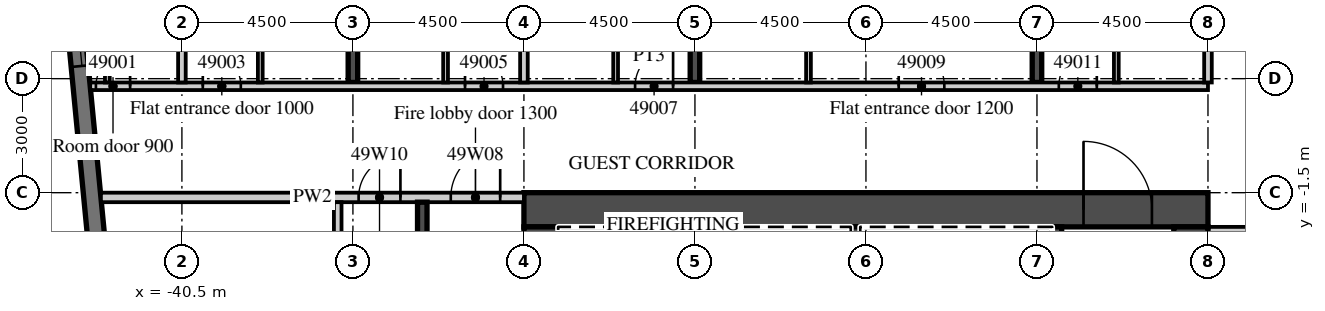
"""IFC4 building model, lengths in metres.
Left out: names, types, materials, properties, quantities, classifications, styles, units other than length and angle.
Written with IfcOpenShell. Run it as: python <this file> out.ifc"""

import sys

from ifc_helpers import new_model, si_unit, direction, frame, frame_2d, origin, place, context, subcontext, project, spatial, rectangle, extrude, element, fill, save


model = new_model("IFC4")
c1 = context("Model", 3, precision=1e-05, world=origin(), true_north=direction((0.0, 1.0)))
c2 = subcontext(c1, "Body", "Model", "MODEL_VIEW")
j1 = project(units=[si_unit("LENGTHUNIT", "METRE"), si_unit("PLANEANGLEUNIT", "RADIAN")], contexts=[c1])
p1 = place(None, origin())
s1 = spatial("IfcSite", under=j1, at=p1, CompositionType="ELEMENT")
p2 = place(p1, origin())
s2 = spatial("IfcBuilding", under=s1, at=p2, CompositionType="ELEMENT")
p3 = place(p2, frame((0.0, 0.0, 203.2)))
s3 = spatial("IfcBuildingStorey", under=s2, at=p3, CompositionType="ELEMENT", Elevation=203.2)
p4 = place(p3, frame((-36.0, 1.4, 0.0), z_axis=(0.0, 0.0, 1.0), x_axis=(0.0, 1.0, 0.0)))
e1 = element("IfcWall", 1, at=p4, inside=s3, PredefinedType="SHEAR", context=c2, shape_type="SweptSolid", body=[
    extrude(rectangle(XDim=15.401, YDim=0.25, at=frame_2d((7.701, 0.0))), origin(), (0.0, 0.0, 1.0), 3.0),
])
p5 = place(p3, frame((-27.0, 1.4, 0.0), z_axis=(0.0, 0.0, 1.0), x_axis=(0.0, 1.0, 0.0)))
e2 = element("IfcWall", 2, at=p5, inside=s3, PredefinedType="SHEAR", context=c2, shape_type="SweptSolid", body=[
    extrude(rectangle(XDim=16.268, YDim=0.25, at=frame_2d((8.134, 0.0))), origin(), (0.0, 0.0, 1.0), 3.0),
])
p6 = place(p3, frame((-18.0, 1.4, 0.0), z_axis=(0.0, 0.0, 1.0), x_axis=(0.0, 1.0, 0.0)))
e3 = element("IfcWall", 3, at=p6, inside=s3, PredefinedType="SHEAR", context=c2, shape_type="SweptSolid", body=[
    extrude(rectangle(XDim=17.134, YDim=0.25, at=frame_2d((8.567, 0.0))), origin(), (0.0, 0.0, 1.0), 3.0),
])
p7 = place(p3, frame((-44.214, 12.466, 0.0), z_axis=(0.0, 0.0, 1.0), x_axis=(0.095847314626, -0.995396047952, 0.0)))
e4 = element("IfcWall", 4, at=p7, inside=s3, PredefinedType="SOLIDWALL", context=c2, shape_type="SweptSolid", body=[
    extrude(rectangle(XDim=34.0, YDim=0.45, at=frame_2d((17.0, 0.0))), origin(), (0.0, 0.0, 1.0), 3.0),
])
p8 = place(p7, frame((2.865, 0.0, 0.45)))
e5 = element("IfcOpeningElement", 5, at=p8, cuts=e4, PredefinedType="OPENING", context=c2, shape_type="SweptSolid", body=[
    extrude(rectangle(XDim=3.3, YDim=2.25, at=frame_2d((1.65, 1.125))), frame((0.0, 0.235, 0.0), z_axis=(0.0, -1.0, 0.0), x_axis=(1.0, 0.0, 0.0)), (0.0, 0.0, 1.0), 0.47),
])
p9 = place(p7, frame((7.386, 0.0, 0.45)))
e6 = element("IfcOpeningElement", 6, at=p9, cuts=e4, PredefinedType="OPENING", context=c2, shape_type="SweptSolid", body=[
    extrude(rectangle(XDim=3.3, YDim=2.25, at=frame_2d((1.65, 1.125))), frame((0.0, 0.235, 0.0), z_axis=(0.0, -1.0, 0.0), x_axis=(1.0, 0.0, 0.0)), (0.0, 0.0, 1.0), 0.47),
])
p10 = place(p3, frame((-42.913, 1.3, 0.0), z_axis=(0.0, 0.0, 1.0), x_axis=(1.0, 0.0, 0.0)))
e7 = element("IfcWall", 7, at=p10, inside=s3, PredefinedType="PARTITIONING", context=c2, shape_type="SweptSolid", body=[
    extrude(rectangle(XDim=29.413, YDim=0.2, at=frame_2d((14.707, 0.0))), origin(), (0.0, 0.0, 1.0), 3.0),
])
p11 = place(p10, frame((0.15, 0.0, 0.0)))
e8 = element("IfcOpeningElement", 8, at=p11, cuts=e7, PredefinedType="OPENING", context=c2, shape_type="SweptSolid", body=[
    extrude(rectangle(XDim=0.9, YDim=2.1, at=frame_2d((0.45, 1.05))), frame((0.0, 0.11, 0.0), z_axis=(0.0, -1.0, 0.0), x_axis=(1.0, 0.0, 0.0)), (0.0, 0.0, 1.0), 0.22),
])
p12 = place(p10, frame((2.963, 0.0, 0.0)))
e9 = element("IfcOpeningElement", 9, at=p12, cuts=e7, PredefinedType="OPENING", context=c2, shape_type="SweptSolid", body=[
    extrude(rectangle(XDim=1.0, YDim=2.1, at=frame_2d((0.5, 1.05))), frame((0.0, 0.11, 0.0), z_axis=(0.0, -1.0, 0.0), x_axis=(1.0, 0.0, 0.0)), (0.0, 0.0, 1.0), 0.22),
])
p13 = place(p10, frame((9.863, 0.0, 0.0)))
e10 = element("IfcOpeningElement", 10, at=p13, cuts=e7, PredefinedType="OPENING", context=c2, shape_type="SweptSolid", body=[
    extrude(rectangle(XDim=1.0, YDim=2.1, at=frame_2d((0.5, 1.05))), frame((0.0, 0.11, 0.0), z_axis=(0.0, -1.0, 0.0), x_axis=(1.0, 0.0, 0.0)), (0.0, 0.0, 1.0), 0.22),
])
p14 = place(p10, frame((14.338, 0.0, 0.0)))
e11 = element("IfcOpeningElement", 11, at=p14, cuts=e7, PredefinedType="OPENING", context=c2, shape_type="SweptSolid", body=[
    extrude(rectangle(XDim=1.0, YDim=2.1, at=frame_2d((0.5, 1.05))), frame((0.0, 0.11, 0.0), z_axis=(0.0, -1.0, 0.0), x_axis=(1.0, 0.0, 0.0)), (0.0, 0.0, 1.0), 0.22),
])
p15 = place(p10, frame((21.275, 0.0, 0.0)))
e12 = element("IfcOpeningElement", 12, at=p15, cuts=e7, PredefinedType="OPENING", context=c2, shape_type="SweptSolid", body=[
    extrude(rectangle(XDim=1.2, YDim=2.1, at=frame_2d((0.6, 1.05))), frame((0.0, 0.11, 0.0), z_axis=(0.0, -1.0, 0.0), x_axis=(1.0, 0.0, 0.0)), (0.0, 0.0, 1.0), 0.22),
])
p16 = place(p10, frame((25.488, 0.0, 0.0)))
e13 = element("IfcOpeningElement", 13, at=p16, cuts=e7, PredefinedType="OPENING", context=c2, shape_type="SweptSolid", body=[
    extrude(rectangle(XDim=1.0, YDim=2.1, at=frame_2d((0.5, 1.05))), frame((0.0, 0.11, 0.0), z_axis=(0.0, -1.0, 0.0), x_axis=(1.0, 0.0, 0.0)), (0.0, 0.0, 1.0), 0.22),
])
p17 = place(p3, frame((-40.5, 1.4, 0.0), z_axis=(0.0, 0.0, 1.0), x_axis=(0.0, 1.0, 0.0)))
e14 = element("IfcWall", 14, at=p17, inside=s3, PredefinedType="PARTITIONING", context=c2, shape_type="SweptSolid", body=[
    extrude(rectangle(XDim=14.99, YDim=0.2, at=frame_2d((7.495, 0.0))), origin(), (0.0, 0.0, 1.0), 3.0),
])
p18 = place(p3, frame((-42.462, 1.4, 0.0), z_axis=(0.0, 0.0, 1.0), x_axis=(0.0, 1.0, 0.0)))
e15 = element("IfcWall", 15, at=p18, inside=s3, PredefinedType="PARTITIONING", context=c2, shape_type="SweptSolid", body=[
    extrude(rectangle(XDim=4.028, YDim=0.125, at=frame_2d((2.014, 0.0))), origin(), (0.0, 0.0, 1.0), 3.0),
])
p19 = place(p18, frame((2.45, 0.0, 0.0)))
e16 = element("IfcOpeningElement", 16, at=p19, cuts=e15, PredefinedType="OPENING", context=c2, shape_type="SweptSolid", body=[
    extrude(rectangle(XDim=0.9, YDim=2.1, at=frame_2d((0.45, 1.05))), frame((0.0, 0.073, 0.0), z_axis=(0.0, -1.0, 0.0), x_axis=(1.0, 0.0, 0.0)), (0.0, 0.0, 1.0), 0.145),
])
p20 = place(p3, frame((-38.438, 1.4, 0.0), z_axis=(0.0, 0.0, 1.0), x_axis=(0.0, 1.0, 0.0)))
e17 = element("IfcWall", 17, at=p20, inside=s3, PredefinedType="PARTITIONING", context=c2, shape_type="SweptSolid", body=[
    extrude(rectangle(XDim=7.725, YDim=0.125, at=frame_2d((3.863, 0.0))), origin(), (0.0, 0.0, 1.0), 3.0),
])
p21 = place(p20, frame((2.45, 0.0, 0.0)))
e18 = element("IfcOpeningElement", 18, at=p21, cuts=e17, PredefinedType="OPENING", context=c2, shape_type="SweptSolid", body=[
    extrude(rectangle(XDim=0.9, YDim=2.1, at=frame_2d((0.45, 1.05))), frame((0.0, 0.073, 0.0), z_axis=(0.0, -1.0, 0.0), x_axis=(1.0, 0.0, 0.0)), (0.0, 0.0, 1.0), 0.145),
])
p22 = place(p3, frame((-31.5, 1.4, 0.0), z_axis=(0.0, 0.0, 1.0), x_axis=(0.0, 1.0, 0.0)))
e19 = element("IfcWall", 19, at=p22, inside=s3, PredefinedType="PARTITIONING", context=c2, shape_type="SweptSolid", body=[
    extrude(rectangle(XDim=15.856, YDim=0.2, at=frame_2d((7.928, 0.0))), origin(), (0.0, 0.0, 1.0), 3.0),
])
p23 = place(p3, frame((-33.562, 1.4, 0.0), z_axis=(0.0, 0.0, 1.0), x_axis=(0.0, 1.0, 0.0)))
e20 = element("IfcWall", 20, at=p23, inside=s3, PredefinedType="PARTITIONING", context=c2, shape_type="SweptSolid", body=[
    extrude(rectangle(XDim=7.725, YDim=0.125, at=frame_2d((3.863, 0.0))), origin(), (0.0, 0.0, 1.0), 3.0),
])
p24 = place(p23, frame((2.45, 0.0, 0.0)))
e21 = element("IfcOpeningElement", 21, at=p24, cuts=e20, PredefinedType="OPENING", context=c2, shape_type="SweptSolid", body=[
    extrude(rectangle(XDim=0.9, YDim=2.1, at=frame_2d((0.45, 1.05))), frame((0.0, 0.073, 0.0), z_axis=(0.0, -1.0, 0.0), x_axis=(1.0, 0.0, 0.0)), (0.0, 0.0, 1.0), 0.145),
])
p25 = place(p3, frame((-29.087, 1.4, 0.0), z_axis=(0.0, 0.0, 1.0), x_axis=(0.0, 1.0, 0.0)))
e22 = element("IfcWall", 22, at=p25, inside=s3, PredefinedType="PARTITIONING", context=c2, shape_type="SweptSolid", body=[
    extrude(rectangle(XDim=7.725, YDim=0.125, at=frame_2d((3.863, 0.0))), origin(), (0.0, 0.0, 1.0), 3.0),
])
p26 = place(p25, frame((2.45, 0.0, 0.0)))
e23 = element("IfcOpeningElement", 23, at=p26, cuts=e22, PredefinedType="OPENING", context=c2, shape_type="SweptSolid", body=[
    extrude(rectangle(XDim=0.9, YDim=2.1, at=frame_2d((0.45, 1.05))), frame((0.0, 0.073, 0.0), z_axis=(0.0, -1.0, 0.0), x_axis=(1.0, 0.0, 0.0)), (0.0, 0.0, 1.0), 0.145),
])
p27 = place(p3, frame((-24.012, 1.4, 0.0), z_axis=(0.0, 0.0, 1.0), x_axis=(0.0, 1.0, 0.0)))
e24 = element("IfcWall", 24, at=p27, inside=s3, PredefinedType="PARTITIONING", context=c2, shape_type="SweptSolid", body=[
    extrude(rectangle(XDim=7.725, YDim=0.125, at=frame_2d((3.863, 0.0))), origin(), (0.0, 0.0, 1.0), 3.0),
])
p28 = place(p27, frame((2.45, 0.0, 0.0)))
e25 = element("IfcOpeningElement", 25, at=p28, cuts=e24, PredefinedType="OPENING", context=c2, shape_type="SweptSolid", body=[
    extrude(rectangle(XDim=0.9, YDim=2.1, at=frame_2d((0.45, 1.05))), frame((0.0, 0.073, 0.0), z_axis=(0.0, -1.0, 0.0), x_axis=(1.0, 0.0, 0.0)), (0.0, 0.0, 1.0), 0.145),
])
p29 = place(p3, frame((-13.5, 1.4, 0.0), z_axis=(0.0, 0.0, 1.0), x_axis=(0.0, 1.0, 0.0)))
e26 = element("IfcWall", 26, at=p29, inside=s3, PredefinedType="PARTITIONING", context=c2, shape_type="SweptSolid", body=[
    extrude(rectangle(XDim=17.59, YDim=0.2, at=frame_2d((8.795, 0.0))), origin(), (0.0, 0.0, 1.0), 3.0),
])
p30 = place(p3, frame((-15.912, 1.4, 0.0), z_axis=(0.0, 0.0, 1.0), x_axis=(0.0, 1.0, 0.0)))
e27 = element("IfcWall", 27, at=p30, inside=s3, PredefinedType="PARTITIONING", context=c2, shape_type="SweptSolid", body=[
    extrude(rectangle(XDim=7.725, YDim=0.125, at=frame_2d((3.863, 0.0))), origin(), (0.0, 0.0, 1.0), 3.0),
])
p31 = place(p30, frame((2.45, 0.0, 0.0)))
e28 = element("IfcOpeningElement", 28, at=p31, cuts=e27, PredefinedType="OPENING", context=c2, shape_type="SweptSolid", body=[
    extrude(rectangle(XDim=0.9, YDim=2.1, at=frame_2d((0.45, 1.05))), frame((0.0, 0.073, 0.0), z_axis=(0.0, -1.0, 0.0), x_axis=(1.0, 0.0, 0.0)), (0.0, 0.0, 1.0), 0.145),
])
p32 = place(p3, frame((-13.5, -2.5, 0.0), z_axis=(0.0, 0.0, 1.0), x_axis=(1.0, 0.0, 0.0)))
e29 = element("IfcWall", 29, at=p32, inside=s3, PredefinedType="PARTITIONING", context=c2, shape_type="SweptSolid", body=[
    extrude(rectangle(XDim=27.0, YDim=0.2, at=frame_2d((13.5, 0.0))), origin(), (0.0, 0.0, 1.0), 3.0),
])
p33 = place(p32, frame((2.925, 0.0, 0.0)))
e30 = element("IfcOpeningElement", 30, at=p33, cuts=e29, PredefinedType="OPENING", context=c2, shape_type="SweptSolid", body=[
    extrude(rectangle(XDim=1.0, YDim=2.1, at=frame_2d((0.5, 1.05))), frame((0.0, 0.11, 0.0), z_axis=(0.0, -1.0, 0.0), x_axis=(1.0, 0.0, 0.0)), (0.0, 0.0, 1.0), 0.22),
])
p34 = place(p32, frame((5.075, 0.0, 0.0)))
e31 = element("IfcOpeningElement", 31, at=p34, cuts=e29, PredefinedType="OPENING", context=c2, shape_type="SweptSolid", body=[
    extrude(rectangle(XDim=1.0, YDim=2.1, at=frame_2d((0.5, 1.05))), frame((0.0, 0.11, 0.0), z_axis=(0.0, -1.0, 0.0), x_axis=(1.0, 0.0, 0.0)), (0.0, 0.0, 1.0), 0.22),
])
p35 = place(p32, frame((11.925, 0.0, 0.0)))
e32 = element("IfcOpeningElement", 32, at=p35, cuts=e29, PredefinedType="OPENING", context=c2, shape_type="SweptSolid", body=[
    extrude(rectangle(XDim=1.0, YDim=2.1, at=frame_2d((0.5, 1.05))), frame((0.0, 0.11, 0.0), z_axis=(0.0, -1.0, 0.0), x_axis=(1.0, 0.0, 0.0)), (0.0, 0.0, 1.0), 0.22),
])
p36 = place(p32, frame((15.938, 0.0, 0.0)))
e33 = element("IfcOpeningElement", 33, at=p36, cuts=e29, PredefinedType="OPENING", context=c2, shape_type="SweptSolid", body=[
    extrude(rectangle(XDim=1.2, YDim=2.1, at=frame_2d((0.6, 1.05))), frame((0.0, 0.11, 0.0), z_axis=(0.0, -1.0, 0.0), x_axis=(1.0, 0.0, 0.0)), (0.0, 0.0, 1.0), 0.22),
])
p37 = place(p32, frame((25.425, 0.0, 0.0)))
e34 = element("IfcOpeningElement", 34, at=p37, cuts=e29, PredefinedType="OPENING", context=c2, shape_type="SweptSolid", body=[
    extrude(rectangle(XDim=1.0, YDim=2.1, at=frame_2d((0.5, 1.05))), frame((0.0, 0.11, 0.0), z_axis=(0.0, -1.0, 0.0), x_axis=(1.0, 0.0, 0.0)), (0.0, 0.0, 1.0), 0.22),
])
p38 = place(p3, frame((-31.5, -1.95, 0.0), z_axis=(0.0, 0.0, 1.0), x_axis=(1.0, 0.0, 0.0)))
e35 = element("IfcWall", 35, at=p38, inside=s3, PredefinedType="SHEAR", context=c2, shape_type="SweptSolid", body=[
    extrude(rectangle(XDim=18.0, YDim=0.9, at=frame_2d((9.0, 0.0))), origin(), (0.0, 0.0, 1.0), 3.0),
])
p39 = place(p38, frame((14.725, 0.0, 0.0)))
e36 = element("IfcOpeningElement", 36, at=p39, cuts=e35, PredefinedType="OPENING", context=c2, shape_type="SweptSolid", body=[
    extrude(rectangle(XDim=1.8, YDim=2.1, at=frame_2d((0.9, 1.05))), frame((0.0, 0.46, 0.0), z_axis=(0.0, -1.0, 0.0), x_axis=(1.0, 0.0, 0.0)), (0.0, 0.0, 1.0), 0.92),
])
p40 = place(p3, frame((-31.05, -15.2, 0.0), z_axis=(0.0, 0.0, 1.0), x_axis=(0.0, 1.0, 0.0)))
e37 = element("IfcWall", 37, at=p40, inside=s3, PredefinedType="SHEAR", context=c2, shape_type="SweptSolid", body=[
    extrude(rectangle(XDim=12.8, YDim=0.9, at=frame_2d((6.4, 0.0))), origin(), (0.0, 0.0, 1.0), 3.0),
])
p41 = place(p40, frame((11.5, 0.0, 0.0)))
e38 = element("IfcOpeningElement", 38, at=p41, cuts=e37, PredefinedType="OPENING", context=c2, shape_type="SweptSolid", body=[
    extrude(rectangle(XDim=1.1, YDim=2.1, at=frame_2d((0.55, 1.05))), frame((0.0, 0.46, 0.0), z_axis=(0.0, -1.0, 0.0), x_axis=(1.0, 0.0, 0.0)), (0.0, 0.0, 1.0), 0.92),
])
p42 = place(p3, frame((-13.95, -14.6, 0.0), z_axis=(0.0, 0.0, 1.0), x_axis=(0.0, 1.0, 0.0)))
e39 = element("IfcWall", 39, at=p42, inside=s3, PredefinedType="SHEAR", context=c2, shape_type="SweptSolid", body=[
    extrude(rectangle(XDim=12.2, YDim=0.9, at=frame_2d((6.1, 0.0))), origin(), (0.0, 0.0, 1.0), 3.0),
])
p43 = place(p3, frame((-17.475, -5.55, 0.0), z_axis=(0.0, 0.0, 1.0), x_axis=(0.0, 1.0, 0.0)))
e40 = element("IfcWall", 40, at=p43, inside=s3, PredefinedType="SHEAR", context=c2, shape_type="SweptSolid", body=[
    extrude(rectangle(XDim=3.15, YDim=0.25, at=frame_2d((1.575, 0.0))), origin(), (0.0, 0.0, 1.0), 3.0),
])
for number, where, z_axis, x_axis in (
    (41, (-27.975, -5.3, 0.0), (0.0, 0.0, 1.0), (0.0, 1.0, 0.0)),
    (42, (-22.775, -5.3, 0.0), (0.0, 0.0, 1.0), (0.0, 1.0, 0.0)),
):
    element("IfcWall", number, at=place(p3, frame(where, z_axis=z_axis, x_axis=x_axis)), inside=s3, PredefinedType="SHEAR", context=c2, shape_type="SweptSolid", body=[
        extrude(rectangle(XDim=2.9, YDim=0.25, at=frame_2d((1.45, 0.0))), origin(), (0.0, 0.0, 1.0), 3.0),
    ])
p44 = place(p3, frame((-42.632, -1.625, 0.0), z_axis=(0.0, 0.0, 1.0), x_axis=(1.0, 0.0, 0.0)))
e43 = element("IfcWall", 43, at=p44, inside=s3, PredefinedType="PARTITIONING", context=c2, shape_type="SweptSolid", body=[
    extrude(rectangle(XDim=11.132, YDim=0.25, at=frame_2d((5.566, 0.0))), origin(), (0.0, 0.0, 1.0), 3.0),
])
p45 = place(p44, frame((9.207, 0.0, 0.0)))
e44 = element("IfcOpeningElement", 44, at=p45, cuts=e43, PredefinedType="OPENING", context=c2, shape_type="SweptSolid", body=[
    extrude(rectangle(XDim=1.3, YDim=2.1, at=frame_2d((0.65, 1.05))), frame((0.0, 0.135, 0.0), z_axis=(0.0, -1.0, 0.0), x_axis=(1.0, 0.0, 0.0)), (0.0, 0.0, 1.0), 0.27),
])
p46 = place(p44, frame((6.781, 0.0, 0.0)))
e45 = element("IfcOpeningElement", 45, at=p46, cuts=e43, PredefinedType="OPENING", context=c2, shape_type="SweptSolid", body=[
    extrude(rectangle(XDim=1.1, YDim=2.1, at=frame_2d((0.55, 1.05))), frame((0.0, 0.135, 0.0), z_axis=(0.0, -1.0, 0.0), x_axis=(1.0, 0.0, 0.0)), (0.0, 0.0, 1.0), 0.27),
])
p47 = place(p3, frame((-34.175, -10.1, 0.0), z_axis=(0.0, 0.0, 1.0), x_axis=(0.0, 1.0, 0.0)))
e46 = element("IfcWall", 46, at=p47, inside=s3, PredefinedType="SHEAR", context=c2, shape_type="SweptSolid", body=[
    extrude(rectangle(XDim=8.35, YDim=0.25, at=frame_2d((4.175, 0.0))), origin(), (0.0, 0.0, 1.0), 3.0),
])
p48 = place(p3, frame((-36.4, -17.7, 0.0), z_axis=(0.0, 0.0, 1.0), x_axis=(0.0, 1.0, 0.0)))
e47 = element("IfcWall", 47, at=p48, inside=s3, PredefinedType="PARTITIONING", context=c2, shape_type="SweptSolid", body=[
    extrude(rectangle(XDim=15.95, YDim=0.2, at=frame_2d((7.975, 0.0))), origin(), (0.0, 0.0, 1.0), 3.0),
])
p49 = place(p48, frame((0.35, 0.0, 0.0)))
e48 = element("IfcOpeningElement", 48, at=p49, cuts=e47, PredefinedType="OPENING", context=c2, shape_type="SweptSolid", body=[
    extrude(rectangle(XDim=0.9, YDim=2.1, at=frame_2d((0.45, 1.05))), frame((0.0, 0.11, 0.0), z_axis=(0.0, -1.0, 0.0), x_axis=(1.0, 0.0, 0.0)), (0.0, 0.0, 1.0), 0.22),
])
p50 = place(p9, origin())
e49 = element("IfcWindow", 49, at=p50, inside=s3, PartitioningType="SINGLE_PANEL", PredefinedType="WINDOW", context=c2, shape_type="SweptSolid", body=[
    extrude(rectangle(XDim=3.3, YDim=2.25, at=frame_2d((1.65, 1.125))), frame((0.0, 0.09, 0.0), z_axis=(0.0, -1.0, 0.0), x_axis=(1.0, 0.0, 0.0)), (0.0, 0.0, 1.0), 0.06),
])
fill(e6, e49)
p51 = place(p11, origin())
e50 = element("IfcDoor", 50, at=p51, inside=s3, OperationType="SINGLE_SWING_RIGHT", PredefinedType="DOOR", context=c2, shape_type="SweptSolid", body=[
    extrude(rectangle(XDim=0.9, YDim=2.1, at=frame_2d((0.45, 1.05))), frame((0.0, 0.025, 0.0), z_axis=(0.0, -1.0, 0.0), x_axis=(1.0, 0.0, 0.0)), (0.0, 0.0, 1.0), 0.05),
])
fill(e8, e50)
p52 = place(p12, origin())
e51 = element("IfcDoor", 51, at=p52, inside=s3, OperationType="SINGLE_SWING_LEFT", PredefinedType="DOOR", context=c2, shape_type="SweptSolid", body=[
    extrude(rectangle(XDim=1.0, YDim=2.1, at=frame_2d((0.5, 1.05))), frame((0.0, 0.025, 0.0), z_axis=(0.0, -1.0, 0.0), x_axis=(1.0, 0.0, 0.0)), (0.0, 0.0, 1.0), 0.05),
])
fill(e9, e51)
p53 = place(p13, origin())
e52 = element("IfcDoor", 52, at=p53, inside=s3, OperationType="SINGLE_SWING_LEFT", PredefinedType="DOOR", context=c2, shape_type="SweptSolid", body=[
    extrude(rectangle(XDim=1.0, YDim=2.1, at=frame_2d((0.5, 1.05))), frame((0.0, 0.025, 0.0), z_axis=(0.0, -1.0, 0.0), x_axis=(1.0, 0.0, 0.0)), (0.0, 0.0, 1.0), 0.05),
])
fill(e10, e52)
p54 = place(p14, origin())
e53 = element("IfcDoor", 53, at=p54, inside=s3, OperationType="SINGLE_SWING_RIGHT", PredefinedType="DOOR", context=c2, shape_type="SweptSolid", body=[
    extrude(rectangle(XDim=1.0, YDim=2.1, at=frame_2d((0.5, 1.05))), frame((0.0, 0.025, 0.0), z_axis=(0.0, -1.0, 0.0), x_axis=(1.0, 0.0, 0.0)), (0.0, 0.0, 1.0), 0.05),
])
fill(e11, e53)
p55 = place(p15, origin())
e54 = element("IfcDoor", 54, at=p55, inside=s3, OperationType="SINGLE_SWING_LEFT", PredefinedType="DOOR", context=c2, shape_type="SweptSolid", body=[
    extrude(rectangle(XDim=1.2, YDim=2.1, at=frame_2d((0.6, 1.05))), frame((0.0, 0.025, 0.0), z_axis=(0.0, -1.0, 0.0), x_axis=(1.0, 0.0, 0.0)), (0.0, 0.0, 1.0), 0.05),
])
fill(e12, e54)
p56 = place(p16, origin())
e55 = element("IfcDoor", 55, at=p56, inside=s3, OperationType="SINGLE_SWING_RIGHT", PredefinedType="DOOR", context=c2, shape_type="SweptSolid", body=[
    extrude(rectangle(XDim=1.0, YDim=2.1, at=frame_2d((0.5, 1.05))), frame((0.0, 0.025, 0.0), z_axis=(0.0, -1.0, 0.0), x_axis=(1.0, 0.0, 0.0)), (0.0, 0.0, 1.0), 0.05),
])
fill(e13, e55)
p57 = place(p39, origin())
e56 = element("IfcDoor", 56, at=p57, inside=s3, OperationType="DOUBLE_DOOR_DOUBLE_SWING", PredefinedType="DOOR", context=c2, shape_type="SweptSolid", body=[
    extrude(rectangle(XDim=1.8, YDim=2.1, at=frame_2d((0.9, 1.05))), frame((0.0, 0.025, 0.0), z_axis=(0.0, -1.0, 0.0), x_axis=(1.0, 0.0, 0.0)), (0.0, 0.0, 1.0), 0.05),
])
fill(e36, e56)
p58 = place(p45, origin())
e57 = element("IfcDoor", 57, at=p58, inside=s3, OperationType="SINGLE_SWING_RIGHT", PredefinedType="DOOR", context=c2, shape_type="SweptSolid", body=[
    extrude(rectangle(XDim=1.3, YDim=2.1, at=frame_2d((0.65, 1.05))), frame((0.0, 0.025, 0.0), z_axis=(0.0, -1.0, 0.0), x_axis=(1.0, 0.0, 0.0)), (0.0, 0.0, 1.0), 0.05),
])
fill(e44, e57)
p59 = place(p46, origin())
e58 = element("IfcDoor", 58, at=p59, inside=s3, OperationType="SINGLE_SWING_RIGHT", PredefinedType="DOOR", context=c2, shape_type="SweptSolid", body=[
    extrude(rectangle(XDim=1.1, YDim=2.1, at=frame_2d((0.55, 1.05))), frame((0.0, 0.025, 0.0), z_axis=(0.0, -1.0, 0.0), x_axis=(1.0, 0.0, 0.0)), (0.0, 0.0, 1.0), 0.05),
])
fill(e45, e58)
save(model, sys.argv[1])
